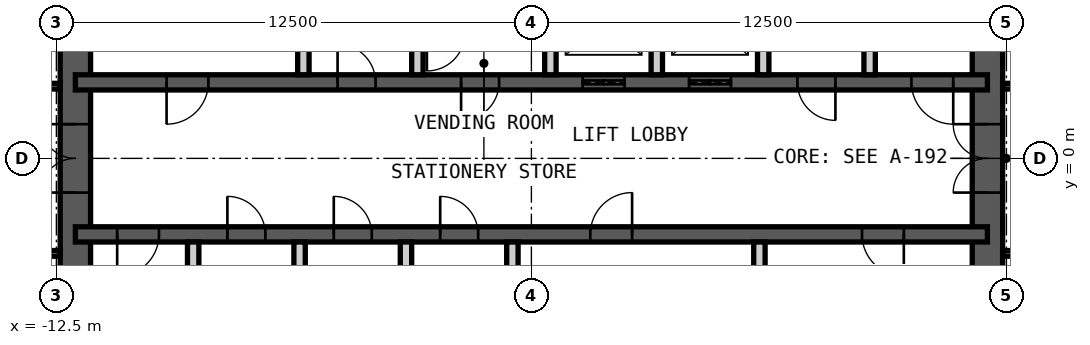
"""IFC4 building model, lengths in metres.
Left out: names, types, materials, properties, quantities, classifications, styles, units other than length and angle.
Written with IfcOpenShell. Run it as: python <this file> out.ifc"""

import sys

from ifc_helpers import new_model, si_unit, direction, frame, frame_2d, origin, place, context, subcontext, project, spatial, rectangle, extrude, element, fill, save


model = new_model("IFC4")
c1 = context("Model", 3, precision=1e-05, world=origin(), true_north=direction((0.0, 1.0)))
c2 = subcontext(c1, "Body", "Model", "MODEL_VIEW")
j1 = project(units=[si_unit("LENGTHUNIT", "METRE"), si_unit("PLANEANGLEUNIT", "RADIAN")], contexts=[c1])
p1 = place(None, origin())
s1 = spatial("IfcSite", under=j1, at=p1, CompositionType="ELEMENT")
p2 = place(p1, origin())
s2 = spatial("IfcBuilding", under=s1, at=p2, CompositionType="ELEMENT")
p3 = place(p2, frame((0.0, 0.0, 320.8)))
s3 = spatial("IfcBuildingStorey", under=s2, at=p3, CompositionType="ELEMENT", Elevation=320.8)
p4 = place(p3, frame((12.0, -9.0, 0.0), z_axis=(0.0, 0.0, 1.0), x_axis=(0.0, 1.0, 0.0)))
e1 = element("IfcWall", 1, at=p4, inside=s3, PredefinedType="SHEAR", context=c2, shape_type="SweptSolid", body=[
    extrude(rectangle(XDim=18.0, YDim=0.8, at=frame_2d((9.0, 0.0))), origin(), (0.0, 0.0, 1.0), 4.2),
])
p5 = place(p4, frame((8.1, 0.0, 0.0)))
e2 = element("IfcOpeningElement", 2, at=p5, cuts=e1, PredefinedType="OPENING", context=c2, shape_type="SweptSolid", body=[
    extrude(rectangle(XDim=1.8, YDim=2.1, at=frame_2d((0.9, 1.05))), frame((0.0, 0.41, 0.0), z_axis=(0.0, -1.0, 0.0), x_axis=(1.0, 0.0, 0.0)), (0.0, 0.0, 1.0), 0.82),
])
p6 = place(p3, frame((-12.0, -9.0, 0.0), z_axis=(0.0, 0.0, 1.0), x_axis=(0.0, 1.0, 0.0)))
e3 = element("IfcWall", 3, at=p6, inside=s3, PredefinedType="SHEAR", context=c2, shape_type="SweptSolid", body=[
    extrude(rectangle(XDim=18.0, YDim=0.8, at=frame_2d((9.0, 0.0))), origin(), (0.0, 0.0, 1.0), 4.2),
])
p7 = place(p6, frame((8.1, 0.0, 0.0)))
e4 = element("IfcOpeningElement", 4, at=p7, cuts=e3, PredefinedType="OPENING", context=c2, shape_type="SweptSolid", body=[
    extrude(rectangle(XDim=1.8, YDim=2.1, at=frame_2d((0.9, 1.05))), frame((0.0, 0.41, 0.0), z_axis=(0.0, -1.0, 0.0), x_axis=(1.0, 0.0, 0.0)), (0.0, 0.0, 1.0), 0.82),
])
p8 = place(p3, frame((-12.0, 2.0, 0.0), z_axis=(0.0, 0.0, 1.0), x_axis=(1.0, 0.0, 0.0)))
e5 = element("IfcWall", 5, at=p8, inside=s3, PredefinedType="SHEAR", context=c2, shape_type="SweptSolid", body=[
    extrude(rectangle(XDim=24.0, YDim=0.4, at=frame_2d((12.0, 0.0))), origin(), (0.0, 0.0, 1.0), 4.2),
])
p9 = place(p8, frame((2.4, 0.0, 0.0)))
e6 = element("IfcOpeningElement", 6, at=p9, cuts=e5, PredefinedType="OPENING", context=c2, shape_type="SweptSolid", body=[
    extrude(rectangle(XDim=1.1, YDim=2.1, at=frame_2d((0.55, 1.05))), frame((0.0, 0.21, 0.0), z_axis=(0.0, -1.0, 0.0), x_axis=(1.0, 0.0, 0.0)), (0.0, 0.0, 1.0), 0.42),
])
p10 = place(p8, frame((22.0, 0.0, 0.0)))
e7 = element("IfcOpeningElement", 7, at=p10, cuts=e5, PredefinedType="OPENING", context=c2, shape_type="SweptSolid", body=[
    extrude(rectangle(XDim=1.1, YDim=2.1, at=frame_2d((0.55, 1.05))), frame((0.0, 0.21, 0.0), z_axis=(0.0, -1.0, 0.0), x_axis=(1.0, 0.0, 0.0)), (0.0, 0.0, 1.0), 0.42),
])
p11 = place(p8, frame((10.15, 0.0, 0.0)))
e8 = element("IfcOpeningElement", 8, at=p11, cuts=e5, PredefinedType="OPENING", context=c2, shape_type="SweptSolid", body=[
    extrude(rectangle(XDim=1.0, YDim=2.1, at=frame_2d((0.5, 1.05))), frame((0.0, 0.21, 0.0), z_axis=(0.0, -1.0, 0.0), x_axis=(1.0, 0.0, 0.0)), (0.0, 0.0, 1.0), 0.42),
])
p12 = place(p8, frame((6.9, 0.0, 0.0)))
e9 = element("IfcOpeningElement", 9, at=p12, cuts=e5, PredefinedType="OPENING", context=c2, shape_type="SweptSolid", body=[
    extrude(rectangle(XDim=1.0, YDim=2.1, at=frame_2d((0.5, 1.05))), frame((0.0, 0.21, 0.0), z_axis=(0.0, -1.0, 0.0), x_axis=(1.0, 0.0, 0.0)), (0.0, 0.0, 1.0), 0.42),
])
p13 = place(p8, frame((13.35, 0.0, 0.0)))
e10 = element("IfcOpeningElement", 10, at=p13, cuts=e5, PredefinedType="OPENING", context=c2, shape_type="SweptSolid", body=[
    extrude(rectangle(XDim=1.1, YDim=2.4, at=frame_2d((0.55, 1.2))), frame((0.0, 0.21, 0.0), z_axis=(0.0, -1.0, 0.0), x_axis=(1.0, 0.0, 0.0)), (0.0, 0.0, 1.0), 0.42),
])
p14 = place(p8, frame((16.15, 0.0, 0.0)))
e11 = element("IfcOpeningElement", 11, at=p14, cuts=e5, PredefinedType="OPENING", context=c2, shape_type="SweptSolid", body=[
    extrude(rectangle(XDim=1.1, YDim=2.4, at=frame_2d((0.55, 1.2))), frame((0.0, 0.21, 0.0), z_axis=(0.0, -1.0, 0.0), x_axis=(1.0, 0.0, 0.0)), (0.0, 0.0, 1.0), 0.42),
])
p15 = place(p8, frame((19.0, 0.0, 0.0)))
e12 = element("IfcOpeningElement", 12, at=p15, cuts=e5, PredefinedType="OPENING", context=c2, shape_type="SweptSolid", body=[
    extrude(rectangle(XDim=1.0, YDim=2.1, at=frame_2d((0.5, 1.05))), frame((0.0, 0.21, 0.0), z_axis=(0.0, -1.0, 0.0), x_axis=(1.0, 0.0, 0.0)), (0.0, 0.0, 1.0), 0.42),
])
p16 = place(p3, frame((-12.0, -2.0, 0.0), z_axis=(0.0, 0.0, 1.0), x_axis=(1.0, 0.0, 0.0)))
e13 = element("IfcWall", 13, at=p16, inside=s3, PredefinedType="SHEAR", context=c2, shape_type="SweptSolid", body=[
    extrude(rectangle(XDim=24.0, YDim=0.4, at=frame_2d((12.0, 0.0))), origin(), (0.0, 0.0, 1.0), 4.2),
])
p17 = place(p16, frame((1.1, 0.0, 0.0)))
e14 = element("IfcOpeningElement", 14, at=p17, cuts=e13, PredefinedType="OPENING", context=c2, shape_type="SweptSolid", body=[
    extrude(rectangle(XDim=1.1, YDim=2.1, at=frame_2d((0.55, 1.05))), frame((0.0, 0.21, 0.0), z_axis=(0.0, -1.0, 0.0), x_axis=(1.0, 0.0, 0.0)), (0.0, 0.0, 1.0), 0.42),
])
p18 = place(p16, frame((13.55, 0.0, 0.0)))
e15 = element("IfcOpeningElement", 15, at=p18, cuts=e13, PredefinedType="OPENING", context=c2, shape_type="SweptSolid", body=[
    extrude(rectangle(XDim=1.1, YDim=2.1, at=frame_2d((0.55, 1.05))), frame((0.0, 0.21, 0.0), z_axis=(0.0, -1.0, 0.0), x_axis=(1.0, 0.0, 0.0)), (0.0, 0.0, 1.0), 0.42),
])
p19 = place(p16, frame((20.7, 0.0, 0.0)))
e16 = element("IfcOpeningElement", 16, at=p19, cuts=e13, PredefinedType="OPENING", context=c2, shape_type="SweptSolid", body=[
    extrude(rectangle(XDim=1.1, YDim=2.1, at=frame_2d((0.55, 1.05))), frame((0.0, 0.21, 0.0), z_axis=(0.0, -1.0, 0.0), x_axis=(1.0, 0.0, 0.0)), (0.0, 0.0, 1.0), 0.42),
])
p20 = place(p16, frame((4.0, 0.0, 0.0)))
e17 = element("IfcOpeningElement", 17, at=p20, cuts=e13, PredefinedType="OPENING", context=c2, shape_type="SweptSolid", body=[
    extrude(rectangle(XDim=1.0, YDim=2.1, at=frame_2d((0.5, 1.05))), frame((0.0, 0.21, 0.0), z_axis=(0.0, -1.0, 0.0), x_axis=(1.0, 0.0, 0.0)), (0.0, 0.0, 1.0), 0.42),
])
p21 = place(p16, frame((6.8, 0.0, 0.0)))
e18 = element("IfcOpeningElement", 18, at=p21, cuts=e13, PredefinedType="OPENING", context=c2, shape_type="SweptSolid", body=[
    extrude(rectangle(XDim=1.0, YDim=2.1, at=frame_2d((0.5, 1.05))), frame((0.0, 0.21, 0.0), z_axis=(0.0, -1.0, 0.0), x_axis=(1.0, 0.0, 0.0)), (0.0, 0.0, 1.0), 0.42),
])
p22 = place(p16, frame((9.6, 0.0, 0.0)))
e19 = element("IfcOpeningElement", 19, at=p22, cuts=e13, PredefinedType="OPENING", context=c2, shape_type="SweptSolid", body=[
    extrude(rectangle(XDim=1.0, YDim=2.1, at=frame_2d((0.5, 1.05))), frame((0.0, 0.21, 0.0), z_axis=(0.0, -1.0, 0.0), x_axis=(1.0, 0.0, 0.0)), (0.0, 0.0, 1.0), 0.42),
])
for number, where, z_axis, x_axis in (
    (20, (-6.0, 2.2, 0.0), (0.0, 0.0, 1.0), (0.0, 1.0, 0.0)),
    (21, (-3.0, 2.2, 0.0), (0.0, 0.0, 1.0), (0.0, 1.0, 0.0)),
    (22, (0.5, 2.2, 0.0), (0.0, 0.0, 1.0), (0.0, 1.0, 0.0)),
    (23, (3.3, 2.2, 0.0), (0.0, 0.0, 1.0), (0.0, 1.0, 0.0)),
    (24, (6.1, 2.2, 0.0), (0.0, 0.0, 1.0), (0.0, 1.0, 0.0)),
    (25, (8.9, 2.2, 0.0), (0.0, 0.0, 1.0), (0.0, 1.0, 0.0)),
    (26, (-8.9, -4.85, 0.0), (0.0, 0.0, 1.0), (0.0, 1.0, 0.0)),
    (27, (-6.1, -4.85, 0.0), (0.0, 0.0, 1.0), (0.0, 1.0, 0.0)),
    (28, (-3.3, -4.85, 0.0), (0.0, 0.0, 1.0), (0.0, 1.0, 0.0)),
    (29, (-0.5, -4.85, 0.0), (0.0, 0.0, 1.0), (0.0, 1.0, 0.0)),
    (30, (6.0, -4.85, 0.0), (0.0, 0.0, 1.0), (0.0, 1.0, 0.0)),
):
    element("IfcWall", number, at=place(p3, frame(where, z_axis=z_axis, x_axis=x_axis)), inside=s3, PredefinedType="PARTITIONING", context=c2, shape_type="SweptSolid", body=[
        extrude(rectangle(XDim=2.65, YDim=0.3, at=frame_2d((1.325, 0.0))), origin(), (0.0, 0.0, 1.0), 3.98),
    ])
p23 = place(p3, frame((12.4, 1.9, 0.0), z_axis=(0.0, 0.0, 1.0), x_axis=(1.0, 0.0, 0.0)))
e31 = element("IfcWall", 31, at=p23, inside=s3, PredefinedType="PARTITIONING", context=c2, shape_type="SweptSolid", body=[
    extrude(rectangle(XDim=2.1, YDim=0.15, at=frame_2d((1.05, 0.0))), origin(), (0.0, 0.0, 1.0), 2.93),
])
p24 = place(p3, frame((12.4, -2.5, 0.0), z_axis=(0.0, 0.0, 1.0), x_axis=(1.0, 0.0, 0.0)))
e32 = element("IfcWall", 32, at=p24, inside=s3, PredefinedType="PARTITIONING", context=c2, shape_type="SweptSolid", body=[
    extrude(rectangle(XDim=2.1, YDim=0.15, at=frame_2d((1.05, 0.0))), origin(), (0.0, 0.0, 1.0), 3.33),
])
for number, where, z_axis, x_axis in (
    (33, (-12.4, 1.9, 0.0), (0.0, 0.0, 1.0), (-1.0, 0.0, 0.0)),
    (34, (-12.4, -2.5, 0.0), (0.0, 0.0, 1.0), (-1.0, 0.0, 0.0)),
):
    element("IfcWall", number, at=place(p3, frame(where, z_axis=z_axis, x_axis=x_axis)), inside=s3, PredefinedType="PARTITIONING", context=c2, shape_type="SweptSolid", body=[
        extrude(rectangle(XDim=2.1, YDim=0.15, at=frame_2d((1.05, 0.0))), origin(), (0.0, 0.0, 1.0), 3.53),
    ])
p25 = place(p9, origin())
e35 = element("IfcDoor", 35, at=p25, inside=s3, OperationType="SINGLE_SWING_LEFT", PredefinedType="DOOR", context=c2, shape_type="SweptSolid", body=[
    extrude(rectangle(XDim=1.1, YDim=2.1, at=frame_2d((0.55, 1.05))), frame((0.0, 0.025, 0.0), z_axis=(0.0, -1.0, 0.0), x_axis=(1.0, 0.0, 0.0)), (0.0, 0.0, 1.0), 0.05),
])
fill(e6, e35)
p26 = place(p17, origin())
e36 = element("IfcDoor", 36, at=p26, inside=s3, OperationType="SINGLE_SWING_LEFT", PredefinedType="DOOR", context=c2, shape_type="SweptSolid", body=[
    extrude(rectangle(XDim=1.1, YDim=2.1, at=frame_2d((0.55, 1.05))), frame((0.0, 0.025, 0.0), z_axis=(0.0, -1.0, 0.0), x_axis=(1.0, 0.0, 0.0)), (0.0, 0.0, 1.0), 0.05),
])
fill(e14, e36)
p27 = place(p10, origin())
e37 = element("IfcDoor", 37, at=p27, inside=s3, OperationType="SINGLE_SWING_RIGHT", PredefinedType="DOOR", context=c2, shape_type="SweptSolid", body=[
    extrude(rectangle(XDim=1.1, YDim=2.1, at=frame_2d((0.55, 1.05))), frame((0.0, 0.025, 0.0), z_axis=(0.0, -1.0, 0.0), x_axis=(1.0, 0.0, 0.0)), (0.0, 0.0, 1.0), 0.05),
])
fill(e7, e37)
p28 = place(p11, origin())
e38 = element("IfcDoor", 38, at=p28, inside=s3, OperationType="SINGLE_SWING_LEFT", PredefinedType="DOOR", context=c2, shape_type="SweptSolid", body=[
    extrude(rectangle(XDim=1.0, YDim=2.1, at=frame_2d((0.5, 1.05))), frame((0.0, 0.025, 0.0), z_axis=(0.0, -1.0, 0.0), x_axis=(1.0, 0.0, 0.0)), (0.0, 0.0, 1.0), 0.05),
])
fill(e8, e38)
p29 = place(p18, origin())
e39 = element("IfcDoor", 39, at=p29, inside=s3, OperationType="SINGLE_SWING_LEFT", PredefinedType="DOOR", context=c2, shape_type="SweptSolid", body=[
    extrude(rectangle(XDim=1.1, YDim=2.1, at=frame_2d((0.55, 1.05))), frame((0.0, 0.025, 0.0), z_axis=(0.0, -1.0, 0.0), x_axis=(1.0, 0.0, 0.0)), (0.0, 0.0, 1.0), 0.05),
])
fill(e15, e39)
p30 = place(p19, origin())
e40 = element("IfcDoor", 40, at=p30, inside=s3, OperationType="SINGLE_SWING_RIGHT", PredefinedType="DOOR", context=c2, shape_type="SweptSolid", body=[
    extrude(rectangle(XDim=1.1, YDim=2.1, at=frame_2d((0.55, 1.05))), frame((0.0, 0.025, 0.0), z_axis=(0.0, -1.0, 0.0), x_axis=(1.0, 0.0, 0.0)), (0.0, 0.0, 1.0), 0.05),
])
fill(e16, e40)
p31 = place(p5, origin())
e41 = element("IfcDoor", 41, at=p31, inside=s3, OperationType="DOUBLE_DOOR_DOUBLE_SWING", PredefinedType="DOOR", context=c2, shape_type="SweptSolid", body=[
    extrude(rectangle(XDim=1.8, YDim=2.1, at=frame_2d((0.9, 1.05))), frame((0.0, 0.025, 0.0), z_axis=(0.0, -1.0, 0.0), x_axis=(1.0, 0.0, 0.0)), (0.0, 0.0, 1.0), 0.05),
])
fill(e2, e41)
p32 = place(p7, origin())
e42 = element("IfcDoor", 42, at=p32, inside=s3, OperationType="DOUBLE_DOOR_DOUBLE_SWING", PredefinedType="DOOR", context=c2, shape_type="SweptSolid", body=[
    extrude(rectangle(XDim=1.8, YDim=2.1, at=frame_2d((0.9, 1.05))), frame((0.0, 0.025, 0.0), z_axis=(0.0, -1.0, 0.0), x_axis=(1.0, 0.0, 0.0)), (0.0, 0.0, 1.0), 0.05),
])
fill(e4, e42)
p33 = place(p12, origin())
e43 = element("IfcDoor", 43, at=p33, inside=s3, OperationType="SINGLE_SWING_RIGHT", PredefinedType="DOOR", context=c2, shape_type="SweptSolid", body=[
    extrude(rectangle(XDim=1.0, YDim=2.1, at=frame_2d((0.5, 1.05))), frame((0.0, 0.025, 0.0), z_axis=(0.0, -1.0, 0.0), x_axis=(1.0, 0.0, 0.0)), (0.0, 0.0, 1.0), 0.05),
])
fill(e9, e43)
p34 = place(p13, origin())
e44 = element("IfcDoor", 44, at=p34, inside=s3, OperationType="DOUBLE_DOOR_SLIDING", PredefinedType="DOOR", context=c2, shape_type="SweptSolid", body=[
    extrude(rectangle(XDim=1.1, YDim=2.4, at=frame_2d((0.55, 1.2))), frame((0.0, 0.025, 0.0), z_axis=(0.0, -1.0, 0.0), x_axis=(1.0, 0.0, 0.0)), (0.0, 0.0, 1.0), 0.05),
])
fill(e10, e44)
p35 = place(p14, origin())
e45 = element("IfcDoor", 45, at=p35, inside=s3, OperationType="DOUBLE_DOOR_SLIDING", PredefinedType="DOOR", context=c2, shape_type="SweptSolid", body=[
    extrude(rectangle(XDim=1.1, YDim=2.4, at=frame_2d((0.55, 1.2))), frame((0.0, 0.025, 0.0), z_axis=(0.0, -1.0, 0.0), x_axis=(1.0, 0.0, 0.0)), (0.0, 0.0, 1.0), 0.05),
])
fill(e11, e45)
p36 = place(p15, origin())
e46 = element("IfcDoor", 46, at=p36, inside=s3, OperationType="SINGLE_SWING_RIGHT", PredefinedType="DOOR", context=c2, shape_type="SweptSolid", body=[
    extrude(rectangle(XDim=1.0, YDim=2.1, at=frame_2d((0.5, 1.05))), frame((0.0, 0.025, 0.0), z_axis=(0.0, -1.0, 0.0), x_axis=(1.0, 0.0, 0.0)), (0.0, 0.0, 1.0), 0.05),
])
fill(e12, e46)
p37 = place(p20, origin())
e47 = element("IfcDoor", 47, at=p37, inside=s3, OperationType="SINGLE_SWING_RIGHT", PredefinedType="DOOR", context=c2, shape_type="SweptSolid", body=[
    extrude(rectangle(XDim=1.0, YDim=2.1, at=frame_2d((0.5, 1.05))), frame((0.0, 0.025, 0.0), z_axis=(0.0, -1.0, 0.0), x_axis=(1.0, 0.0, 0.0)), (0.0, 0.0, 1.0), 0.05),
])
fill(e17, e47)
p38 = place(p21, origin())
e48 = element("IfcDoor", 48, at=p38, inside=s3, OperationType="SINGLE_SWING_RIGHT", PredefinedType="DOOR", context=c2, shape_type="SweptSolid", body=[
    extrude(rectangle(XDim=1.0, YDim=2.1, at=frame_2d((0.5, 1.05))), frame((0.0, 0.025, 0.0), z_axis=(0.0, -1.0, 0.0), x_axis=(1.0, 0.0, 0.0)), (0.0, 0.0, 1.0), 0.05),
])
fill(e18, e48)
p39 = place(p22, origin())
e49 = element("IfcDoor", 49, at=p39, inside=s3, OperationType="SINGLE_SWING_RIGHT", PredefinedType="DOOR", context=c2, shape_type="SweptSolid", body=[
    extrude(rectangle(XDim=1.0, YDim=2.1, at=frame_2d((0.5, 1.05))), frame((0.0, 0.025, 0.0), z_axis=(0.0, -1.0, 0.0), x_axis=(1.0, 0.0, 0.0)), (0.0, 0.0, 1.0), 0.05),
])
fill(e19, e49)
save(model, sys.argv[1])
